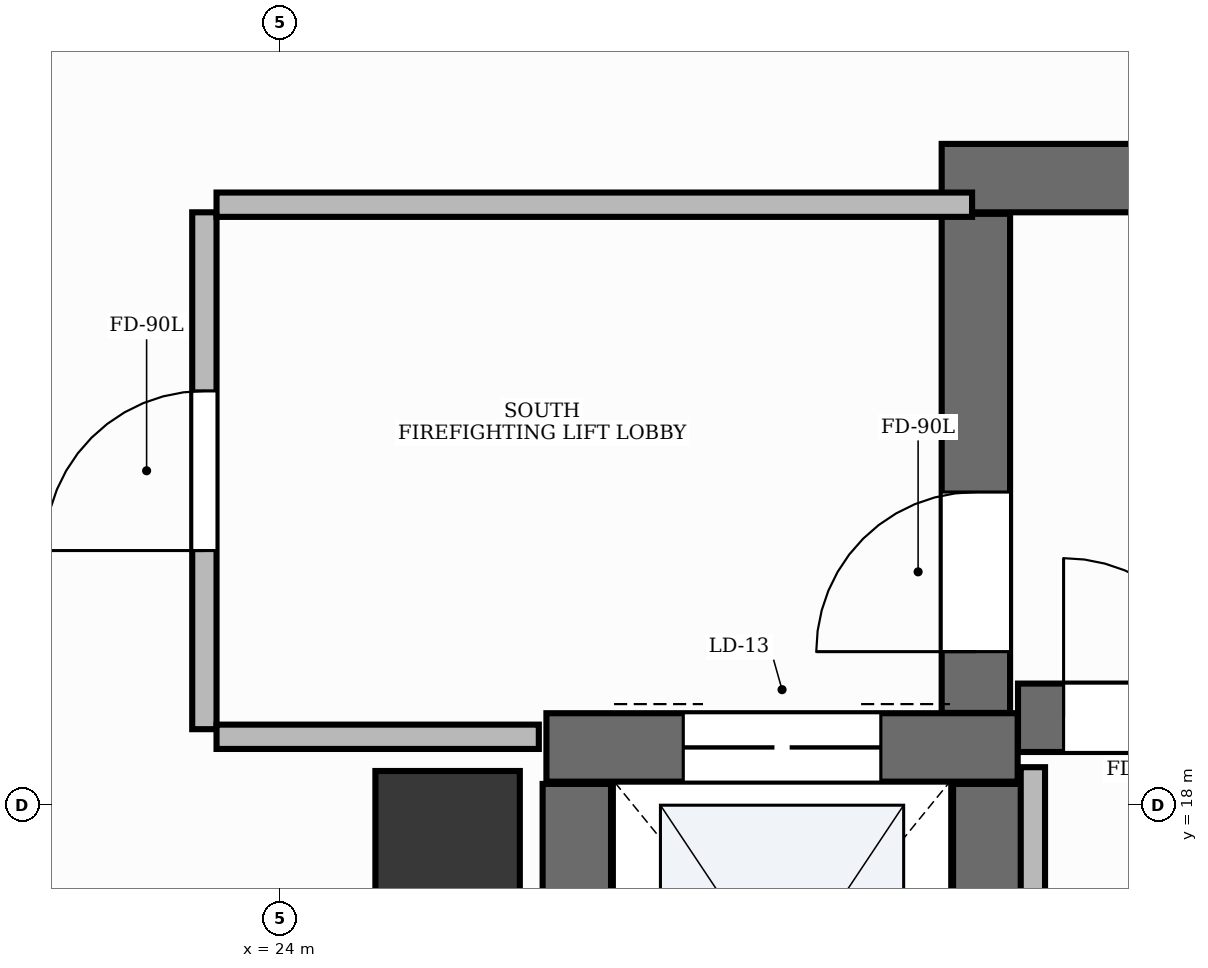
"""IFC4 building model, lengths in metres.
Left out: names, types, materials, properties, quantities, classifications, styles, units other than length and angle.
Written with IfcOpenShell. Run it as: python <this file> out.ifc"""

import sys

from ifc_helpers import new_model, si_unit, direction, frame, frame_2d, origin, origin_2d, place, context, subcontext, project, spatial, rectangle, extrude, element, fill, save


model = new_model("IFC4")
c1 = context("Model", 3, precision=1e-05, world=origin(), true_north=direction((0.0, 1.0)))
c2 = subcontext(c1, "Body", "Model", "MODEL_VIEW")
j1 = project(units=[si_unit("LENGTHUNIT", "METRE"), si_unit("PLANEANGLEUNIT", "RADIAN")], contexts=[c1])
p1 = place(None, origin())
s1 = spatial("IfcSite", under=j1, at=p1, CompositionType="ELEMENT")
p2 = place(p1, origin())
s2 = spatial("IfcBuilding", under=s1, at=p2, CompositionType="ELEMENT")
p3 = place(p2, origin())
s3 = spatial("IfcBuildingStorey", under=s2, at=p3, CompositionType="ELEMENT", Elevation=0.0)
p4 = place(p3, frame((28.852, 18.575, 0.0), z_axis=(0.0, 0.0, 1.0), x_axis=(1.0, 0.0, 0.0)))
e1 = element("IfcWall", 1, at=p4, inside=s3, PredefinedType="SHEAR", context=c2, shape_type="SweptSolid", body=[
    extrude(rectangle(XDim=8.248, YDim=0.45, at=frame_2d((4.124, 0.0))), origin(), (0.0, 0.0, 1.0), 5.1),
])
p5 = place(p4, frame((0.3, 0.0, 0.0)))
e2 = element("IfcOpeningElement", 2, at=p5, cuts=e1, PredefinedType="OPENING", context=c2, shape_type="SweptSolid", body=[
    extrude(rectangle(XDim=1.05, YDim=2.15, at=frame_2d((0.525, 1.075))), frame((0.0, 0.24, 0.0), z_axis=(0.0, -1.0, 0.0), x_axis=(1.0, 0.0, 0.0)), (0.0, 0.0, 1.0), 0.48),
])
p6 = place(p3, frame((28.35, 22.125, 0.0), z_axis=(0.0, 0.0, 1.0), x_axis=(1.0, 0.0, 0.0)))
e3 = element("IfcWall", 3, at=p6, inside=s3, PredefinedType="SHEAR", context=c2, shape_type="SweptSolid", body=[
    extrude(rectangle(XDim=8.75, YDim=0.45, at=frame_2d((4.375, 0.0))), origin(), (0.0, 0.0, 1.0), 5.1),
])
p7 = place(p3, frame((28.575, 18.607, 0.0), z_axis=(0.0, 0.0, 1.0), x_axis=(0.0, 1.0, 0.0)))
e4 = element("IfcWall", 4, at=p7, inside=s3, PredefinedType="SHEAR", context=c2, shape_type="SweptSolid", body=[
    extrude(rectangle(XDim=3.283, YDim=0.45, at=frame_2d((1.642, 0.0))), origin(), (0.0, 0.0, 1.0), 5.1),
])
p8 = place(p7, frame((0.403, 0.0, 0.0)))
e5 = element("IfcOpeningElement", 5, at=p8, cuts=e4, PredefinedType="OPENING", context=c2, shape_type="SweptSolid", body=[
    extrude(rectangle(XDim=1.05, YDim=2.15, at=frame_2d((0.525, 1.075))), frame((0.0, 0.24, 0.0), z_axis=(0.0, -1.0, 0.0), x_axis=(1.0, 0.0, 0.0)), (0.0, 0.0, 1.0), 0.48),
])
p9 = place(p3, frame((25.75, 18.38, 0.0), z_axis=(0.0, 0.0, 1.0), x_axis=(1.0, 0.0, 0.0)))
e6 = element("IfcWall", 6, at=p9, inside=s3, PredefinedType="SHEAR", context=c2, shape_type="SweptSolid", body=[
    extrude(rectangle(XDim=3.1, YDim=0.45, at=frame_2d((1.55, 0.0))), origin(), (0.0, 0.0, 1.0), 5.1),
])
p10 = place(p9, frame((0.9, 0.0, 0.0)))
e7 = element("IfcOpeningElement", 7, at=p10, cuts=e6, PredefinedType="OPENING", context=c2, shape_type="SweptSolid", body=[
    extrude(rectangle(XDim=1.3, YDim=2.2, at=frame_2d((0.65, 1.1))), frame((0.0, 0.24, 0.0), z_axis=(0.0, -1.0, 0.0), x_axis=(1.0, 0.0, 0.0)), (0.0, 0.0, 1.0), 0.48),
])
for number, where, z_axis, x_axis in (
    (8, (25.95, 15.44, 0.0), (0.0, 0.0, 1.0), (0.0, 1.0, 0.0)),
    (9, (28.65, 15.44, 0.0), (0.0, 0.0, 1.0), (0.0, 1.0, 0.0)),
):
    element("IfcWall", number, at=place(p3, frame(where, z_axis=z_axis, x_axis=x_axis)), inside=s3, PredefinedType="SHEAR", context=c2, shape_type="SweptSolid", body=[
        extrude(rectangle(XDim=2.7, YDim=0.45, at=frame_2d((1.35, 0.0))), origin(), (0.0, 0.0, 1.0), 5.1),
    ])
p11 = place(p3, frame((25.1, 17.75, -0.0), z_axis=(0.0, 0.0, 1.0), x_axis=(1.0, 0.0, 0.0)))
e10 = element("IfcColumn", 10, at=p11, inside=s3, PredefinedType="PILASTER", context=c2, shape_type="SweptSolid", body=[
    extrude(rectangle(XDim=0.95, YDim=0.95, at=origin_2d()), origin(), (0.0, 0.0, 1.0), 5.101),
])
p12 = place(p3, frame((23.5, 18.5, 0.0), z_axis=(0.0, 0.0, 1.0), x_axis=(0.0, 1.0, 0.0)))
e11 = element("IfcWall", 11, at=p12, inside=s3, PredefinedType="PARTITIONING", context=c2, shape_type="SweptSolid", body=[
    extrude(rectangle(XDim=3.4, YDim=0.16, at=frame_2d((1.7, 0.0))), origin(), (0.0, 0.0, 1.0), 4.11),
])
p13 = place(p12, frame((1.175, 0.0, 0.0)))
e12 = element("IfcOpeningElement", 12, at=p13, cuts=e11, PredefinedType="OPENING", context=c2, shape_type="SweptSolid", body=[
    extrude(rectangle(XDim=1.05, YDim=2.15, at=frame_2d((0.525, 1.075))), frame((0.0, 0.095, 0.0), z_axis=(0.0, -1.0, 0.0), x_axis=(1.0, 0.0, 0.0)), (0.0, 0.0, 1.0), 0.19),
])
p14 = place(p3, frame((23.58, 21.95, 0.0), z_axis=(0.0, 0.0, 1.0), x_axis=(1.0, 0.0, 0.0)))
e13 = element("IfcWall", 13, at=p14, inside=s3, PredefinedType="PARTITIONING", context=c2, shape_type="SweptSolid", body=[
    extrude(rectangle(XDim=4.97, YDim=0.16, at=frame_2d((2.485, 0.0))), origin(), (0.0, 0.0, 1.0), 4.11),
])
p15 = place(p3, frame((23.58, 18.45, 0.0), z_axis=(0.0, 0.0, 1.0), x_axis=(1.0, 0.0, 0.0)))
e14 = element("IfcWall", 14, at=p15, inside=s3, PredefinedType="PARTITIONING", context=c2, shape_type="SweptSolid", body=[
    extrude(rectangle(XDim=2.12, YDim=0.16, at=frame_2d((1.06, 0.0))), origin(), (0.0, 0.0, 1.0), 4.11),
])
p16 = place(p3, frame((28.95, 18.25, 0.0), z_axis=(0.0, 0.0, 1.0), x_axis=(0.0, -1.0, 0.0)))
e15 = element("IfcWall", 15, at=p16, inside=s3, PredefinedType="PARTITIONING", context=c2, shape_type="SweptSolid", body=[
    extrude(rectangle(XDim=14.45, YDim=0.16, at=frame_2d((7.225, 0.0))), origin(), (0.0, 0.0, 1.0), 4.11),
])
p17 = place(p16, frame((10.25, 0.0, 0.0)))
e16 = element("IfcOpeningElement", 16, at=p17, cuts=e15, PredefinedType="OPENING", context=c2, shape_type="SweptSolid", body=[
    extrude(rectangle(XDim=1.05, YDim=2.15, at=frame_2d((0.525, 1.075))), frame((0.0, 0.095, 0.0), z_axis=(0.0, -1.0, 0.0), x_axis=(1.0, 0.0, 0.0)), (0.0, 0.0, 1.0), 0.19),
])
p18 = place(p8, origin())
e17 = element("IfcDoor", 17, at=p18, inside=s3, OperationType="SINGLE_SWING_LEFT", PredefinedType="DOOR", context=c2, shape_type="SweptSolid", body=[
    extrude(rectangle(XDim=1.05, YDim=2.15, at=frame_2d((0.525, 1.075))), frame((0.0, 0.025, 0.0), z_axis=(0.0, -1.0, 0.0), x_axis=(1.0, 0.0, 0.0)), (0.0, 0.0, 1.0), 0.05),
])
fill(e5, e17)
p19 = place(p5, origin())
e18 = element("IfcDoor", 18, at=p19, inside=s3, OperationType="SINGLE_SWING_LEFT", PredefinedType="DOOR", context=c2, shape_type="SweptSolid", body=[
    extrude(rectangle(XDim=1.05, YDim=2.15, at=frame_2d((0.525, 1.075))), frame((0.0, 0.025, 0.0), z_axis=(0.0, -1.0, 0.0), x_axis=(1.0, 0.0, 0.0)), (0.0, 0.0, 1.0), 0.05),
])
fill(e2, e18)
p20 = place(p10, origin())
e19 = element("IfcDoor", 19, at=p20, inside=s3, OperationType="DOUBLE_DOOR_SLIDING", PredefinedType="DOOR", context=c2, shape_type="SweptSolid", body=[
    extrude(rectangle(XDim=1.3, YDim=2.2, at=frame_2d((0.65, 1.1))), frame((0.0, 0.025, 0.0), z_axis=(0.0, -1.0, 0.0), x_axis=(1.0, 0.0, 0.0)), (0.0, 0.0, 1.0), 0.05),
])
fill(e7, e19)
p21 = place(p13, origin())
e20 = element("IfcDoor", 20, at=p21, inside=s3, OperationType="SINGLE_SWING_LEFT", PredefinedType="DOOR", context=c2, shape_type="SweptSolid", body=[
    extrude(rectangle(XDim=1.05, YDim=2.15, at=frame_2d((0.525, 1.075))), frame((0.0, 0.025, 0.0), z_axis=(0.0, -1.0, 0.0), x_axis=(1.0, 0.0, 0.0)), (0.0, 0.0, 1.0), 0.05),
])
fill(e12, e20)
save(model, sys.argv[1])
